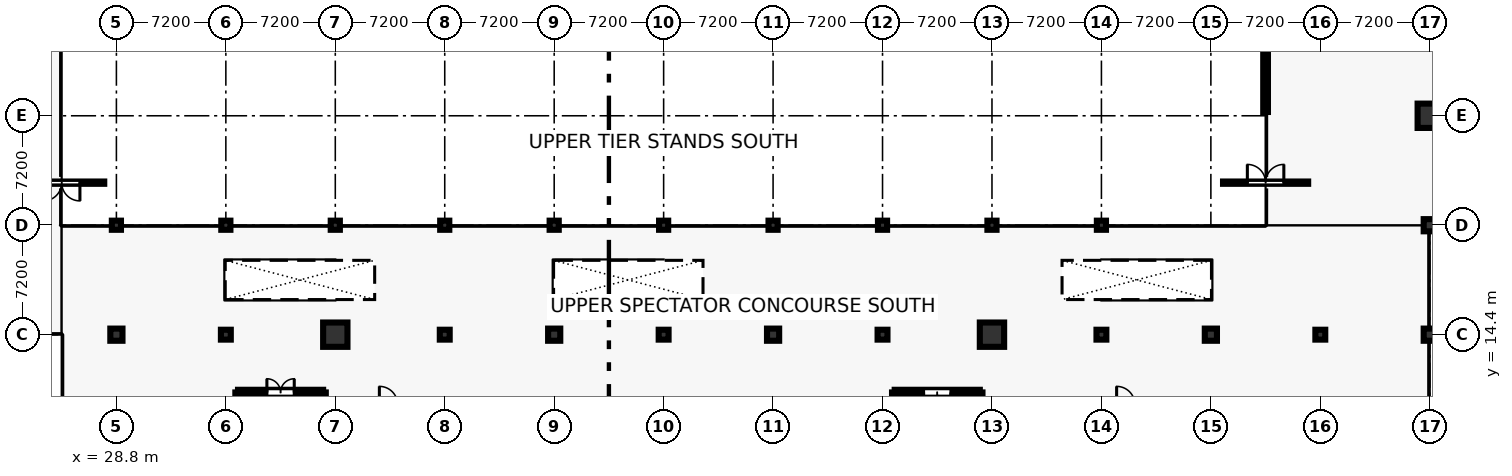
"""IFC4 building model, lengths in metres.
Left out: names, types, materials, properties, quantities, classifications, styles, units other than length and angle.
Written with IfcOpenShell. Run it as: python <this file> out.ifc"""

import sys

from ifc_helpers import new_model, si_unit, direction, frame, frame_2d, origin, origin_2d, place, context, subcontext, project, spatial, rectangle, circle, extrude, element, fill, save


model = new_model("IFC4")
c1 = context("Model", 3, precision=1e-05, world=origin(), true_north=direction((0.0, 1.0)))
c2 = subcontext(c1, "Body", "Model", "MODEL_VIEW")
j1 = project(units=[si_unit("LENGTHUNIT", "METRE"), si_unit("PLANEANGLEUNIT", "RADIAN")], contexts=[c1])
p1 = place(None, origin())
s1 = spatial("IfcSite", under=j1, at=p1, CompositionType="ELEMENT")
p2 = place(p1, origin())
s2 = spatial("IfcBuilding", under=s1, at=p2, CompositionType="ELEMENT")
p3 = place(p2, frame((0.0, 0.0, 13.8)))
s3 = spatial("IfcBuildingStorey", under=s2, at=p3, CompositionType="ELEMENT", Elevation=13.8)
p4 = place(p3, frame((28.8, 14.4, 0.0), z_axis=(0.0, 0.0, 1.0), x_axis=(1.0, 0.0, 0.0)))
e1 = element("IfcColumn", 1, at=p4, inside=s3, PredefinedType="COLUMN", context=c2, shape_type="SweptSolid", body=[
    extrude(circle(Radius=0.4, at=origin_2d()), origin(), (0.0, 0.0, 1.0), 4.8),
])
p5 = place(p3, frame((28.8, 21.6, 0.0), z_axis=(0.0, 0.0, 1.0), x_axis=(1.0, 0.0, 0.0)))
e2 = element("IfcColumn", 2, at=p5, inside=s3, PredefinedType="COLUMN", context=c2, shape_type="SweptSolid", body=[
    extrude(rectangle(XDim=0.6, YDim=0.6, at=origin_2d()), origin(), (0.0, 0.0, 1.0), 4.8),
])
p6 = place(p3, frame((36.0, 14.4, 0.0), z_axis=(0.0, 0.0, 1.0), x_axis=(1.0, 0.0, 0.0)))
e3 = element("IfcColumn", 3, at=p6, inside=s3, PredefinedType="COLUMN", context=c2, shape_type="SweptSolid", body=[
    extrude(rectangle(XDim=0.65, YDim=0.65, at=origin_2d()), origin(), (0.0, 0.0, 1.0), 4.8),
])
p7 = place(p3, frame((36.0, 21.6, 0.0), z_axis=(0.0, 0.0, 1.0), x_axis=(1.0, 0.0, 0.0)))
e4 = element("IfcColumn", 4, at=p7, inside=s3, PredefinedType="COLUMN", context=c2, shape_type="SweptSolid", body=[
    extrude(rectangle(XDim=0.6, YDim=0.6, at=origin_2d()), origin(), (0.0, 0.0, 1.0), 4.8),
])
p8 = place(p3, frame((43.2, 14.4, 0.0), z_axis=(0.0, 0.0, 1.0), x_axis=(1.0, 0.0, 0.0)))
e5 = element("IfcColumn", 5, at=p8, inside=s3, PredefinedType="COLUMN", context=c2, shape_type="SweptSolid", body=[
    extrude(circle(Radius=0.8, at=origin_2d()), origin(), (0.0, 0.0, 1.0), 4.8),
])
p9 = place(p3, frame((43.2, 21.6, 0.0), z_axis=(0.0, 0.0, 1.0), x_axis=(1.0, 0.0, 0.0)))
e6 = element("IfcColumn", 6, at=p9, inside=s3, PredefinedType="COLUMN", context=c2, shape_type="SweptSolid", body=[
    extrude(rectangle(XDim=0.6, YDim=0.6, at=origin_2d()), origin(), (0.0, 0.0, 1.0), 4.8),
])
p10 = place(p3, frame((50.4, 14.4, 0.0), z_axis=(0.0, 0.0, 1.0), x_axis=(1.0, 0.0, 0.0)))
e7 = element("IfcColumn", 7, at=p10, inside=s3, PredefinedType="COLUMN", context=c2, shape_type="SweptSolid", body=[
    extrude(rectangle(XDim=0.65, YDim=0.65, at=origin_2d()), origin(), (0.0, 0.0, 1.0), 4.8),
])
p11 = place(p3, frame((50.4, 21.6, 0.0), z_axis=(0.0, 0.0, 1.0), x_axis=(1.0, 0.0, 0.0)))
e8 = element("IfcColumn", 8, at=p11, inside=s3, PredefinedType="COLUMN", context=c2, shape_type="SweptSolid", body=[
    extrude(rectangle(XDim=0.6, YDim=0.6, at=origin_2d()), origin(), (0.0, 0.0, 1.0), 4.8),
])
p12 = place(p3, frame((57.6, 14.4, 0.0), z_axis=(0.0, 0.0, 1.0), x_axis=(1.0, 0.0, 0.0)))
e9 = element("IfcColumn", 9, at=p12, inside=s3, PredefinedType="COLUMN", context=c2, shape_type="SweptSolid", body=[
    extrude(circle(Radius=0.4, at=origin_2d()), origin(), (0.0, 0.0, 1.0), 4.8),
])
p13 = place(p3, frame((57.6, 21.6, 0.0), z_axis=(0.0, 0.0, 1.0), x_axis=(1.0, 0.0, 0.0)))
e10 = element("IfcColumn", 10, at=p13, inside=s3, PredefinedType="COLUMN", context=c2, shape_type="SweptSolid", body=[
    extrude(rectangle(XDim=0.6, YDim=0.6, at=origin_2d()), origin(), (0.0, 0.0, 1.0), 4.8),
])
p14 = place(p3, frame((64.8, 14.4, 0.0), z_axis=(0.0, 0.0, 1.0), x_axis=(1.0, 0.0, 0.0)))
e11 = element("IfcColumn", 11, at=p14, inside=s3, PredefinedType="COLUMN", context=c2, shape_type="SweptSolid", body=[
    extrude(rectangle(XDim=0.65, YDim=0.65, at=origin_2d()), origin(), (0.0, 0.0, 1.0), 4.8),
])
p15 = place(p3, frame((64.8, 21.6, 0.0), z_axis=(0.0, 0.0, 1.0), x_axis=(1.0, 0.0, 0.0)))
e12 = element("IfcColumn", 12, at=p15, inside=s3, PredefinedType="COLUMN", context=c2, shape_type="SweptSolid", body=[
    extrude(rectangle(XDim=0.6, YDim=0.6, at=origin_2d()), origin(), (0.0, 0.0, 1.0), 4.8),
])
p16 = place(p3, frame((72.0, 14.4, 0.0), z_axis=(0.0, 0.0, 1.0), x_axis=(1.0, 0.0, 0.0)))
e13 = element("IfcColumn", 13, at=p16, inside=s3, PredefinedType="COLUMN", context=c2, shape_type="SweptSolid", body=[
    extrude(circle(Radius=0.4, at=origin_2d()), origin(), (0.0, 0.0, 1.0), 4.8),
])
p17 = place(p3, frame((72.0, 21.6, 0.0), z_axis=(0.0, 0.0, 1.0), x_axis=(1.0, 0.0, 0.0)))
e14 = element("IfcColumn", 14, at=p17, inside=s3, PredefinedType="COLUMN", context=c2, shape_type="SweptSolid", body=[
    extrude(rectangle(XDim=0.6, YDim=0.6, at=origin_2d()), origin(), (0.0, 0.0, 1.0), 4.8),
])
p18 = place(p3, frame((79.2, 14.4, 0.0), z_axis=(0.0, 0.0, 1.0), x_axis=(1.0, 0.0, 0.0)))
e15 = element("IfcColumn", 15, at=p18, inside=s3, PredefinedType="COLUMN", context=c2, shape_type="SweptSolid", body=[
    extrude(rectangle(XDim=0.65, YDim=0.65, at=origin_2d()), origin(), (0.0, 0.0, 1.0), 4.8),
])
p19 = place(p3, frame((79.2, 21.6, 0.0), z_axis=(0.0, 0.0, 1.0), x_axis=(1.0, 0.0, 0.0)))
e16 = element("IfcColumn", 16, at=p19, inside=s3, PredefinedType="COLUMN", context=c2, shape_type="SweptSolid", body=[
    extrude(rectangle(XDim=0.6, YDim=0.6, at=origin_2d()), origin(), (0.0, 0.0, 1.0), 4.8),
])
p20 = place(p3, frame((86.4, 14.4, 0.0), z_axis=(0.0, 0.0, 1.0), x_axis=(1.0, 0.0, 0.0)))
e17 = element("IfcColumn", 17, at=p20, inside=s3, PredefinedType="COLUMN", context=c2, shape_type="SweptSolid", body=[
    extrude(circle(Radius=0.8, at=origin_2d()), origin(), (0.0, 0.0, 1.0), 4.8),
])
p21 = place(p3, frame((86.4, 21.6, 0.0), z_axis=(0.0, 0.0, 1.0), x_axis=(1.0, 0.0, 0.0)))
e18 = element("IfcColumn", 18, at=p21, inside=s3, PredefinedType="COLUMN", context=c2, shape_type="SweptSolid", body=[
    extrude(rectangle(XDim=0.6, YDim=0.6, at=origin_2d()), origin(), (0.0, 0.0, 1.0), 4.8),
])
p22 = place(p3, frame((93.6, 14.4, 0.0), z_axis=(0.0, 0.0, 1.0), x_axis=(1.0, 0.0, 0.0)))
e19 = element("IfcColumn", 19, at=p22, inside=s3, PredefinedType="COLUMN", context=c2, shape_type="SweptSolid", body=[
    extrude(rectangle(XDim=0.65, YDim=0.65, at=origin_2d()), origin(), (0.0, 0.0, 1.0), 4.8),
])
p23 = place(p3, frame((93.6, 21.6, 0.0), z_axis=(0.0, 0.0, 1.0), x_axis=(1.0, 0.0, 0.0)))
e20 = element("IfcColumn", 20, at=p23, inside=s3, PredefinedType="COLUMN", context=c2, shape_type="SweptSolid", body=[
    extrude(rectangle(XDim=0.6, YDim=0.6, at=origin_2d()), origin(), (0.0, 0.0, 1.0), 4.8),
])
p24 = place(p3, frame((100.8, 14.4, 0.0), z_axis=(0.0, 0.0, 1.0), x_axis=(1.0, 0.0, 0.0)))
e21 = element("IfcColumn", 21, at=p24, inside=s3, PredefinedType="COLUMN", context=c2, shape_type="SweptSolid", body=[
    extrude(circle(Radius=0.4, at=origin_2d()), origin(), (0.0, 0.0, 1.0), 4.8),
])
p25 = place(p3, frame((108.0, 14.4, 0.0), z_axis=(0.0, 0.0, 1.0), x_axis=(1.0, 0.0, 0.0)))
e22 = element("IfcColumn", 22, at=p25, inside=s3, PredefinedType="COLUMN", context=c2, shape_type="SweptSolid", body=[
    extrude(rectangle(XDim=0.65, YDim=0.65, at=origin_2d()), origin(), (0.0, 0.0, 1.0), 4.8),
])
for number, where, z_axis, x_axis in (
    (23, (115.2, 14.4, 0.0), (0.0, 0.0, 1.0), (1.0, 0.0, 0.0)),
    (24, (115.2, 21.6, 0.0), (0.0, 0.0, 1.0), (1.0, 0.0, 0.0)),
):
    element("IfcColumn", number, at=place(p3, frame(where, z_axis=z_axis, x_axis=x_axis)), inside=s3, PredefinedType="COLUMN", context=c2, shape_type="SweptSolid", body=[
        extrude(circle(Radius=0.4, at=origin_2d()), origin(), (0.0, 0.0, 1.0), 4.8),
    ])
p26 = place(p3, frame((115.2, 28.8, 0.0), z_axis=(0.0, 0.0, 1.0), x_axis=(1.0, 0.0, 0.0)))
e25 = element("IfcColumn", 25, at=p26, inside=s3, PredefinedType="COLUMN", context=c2, shape_type="SweptSolid", body=[
    extrude(circle(Radius=0.8, at=origin_2d()), origin(), (0.0, 0.0, 1.0), 4.8),
])
p27 = place(p3, frame((104.4, 29.05, 0.0), z_axis=(0.0, 0.0, 1.0), x_axis=(0.0, 1.0, 0.0)))
e26 = element("IfcWall", 26, at=p27, inside=s3, PredefinedType="SOLIDWALL", context=c2, shape_type="SweptSolid", body=[
    extrude(rectangle(XDim=6.7, YDim=0.31, at=frame_2d((3.35, 0.0))), origin(), (0.0, 0.0, 1.0), 3.59),
])
p28 = place(p27, frame((2.4, 0.0, 0.9)))
e27 = element("IfcOpeningElement", 27, at=p28, cuts=e26, PredefinedType="OPENING", context=c2, shape_type="SweptSolid", body=[
    extrude(rectangle(XDim=1.9, YDim=1.3, at=frame_2d((0.95, 0.65))), frame((0.0, 0.165, 0.0), z_axis=(0.0, -1.0, 0.0), x_axis=(1.0, 0.0, 0.0)), (0.0, 0.0, 1.0), 0.33),
])
p29 = place(p3, frame((42.4, 6.8, 0.0), z_axis=(0.0, 0.0, 1.0), x_axis=(0.0, 1.0, 0.0)))
e28 = element("IfcWall", 28, at=p29, inside=s3, PredefinedType="SHEAR", context=c2, shape_type="SweptSolid", body=[
    extrude(rectangle(XDim=3.8, YDim=0.35, at=frame_2d((1.9, 0.0))), origin(), (0.0, 0.0, 1.0), 3.59),
])
p30 = place(p3, frame((42.4, 10.6, 0.0), z_axis=(0.0, 0.0, 1.0), x_axis=(-1.0, 0.0, 0.0)))
e29 = element("IfcWall", 29, at=p30, inside=s3, PredefinedType="SHEAR", context=c2, shape_type="SweptSolid", body=[
    extrude(rectangle(XDim=5.6, YDim=0.35, at=frame_2d((2.8, 0.0))), origin(), (0.0, 0.0, 1.0), 3.59),
])
p31 = place(p30, frame((1.9, 0.0, 0.0)))
e30 = element("IfcOpeningElement", 30, at=p31, cuts=e29, PredefinedType="OPENING", context=c2, shape_type="SweptSolid", body=[
    extrude(rectangle(XDim=1.8, YDim=2.3, at=frame_2d((0.9, 1.15))), frame((0.0, 0.185, 0.0), z_axis=(0.0, -1.0, 0.0), x_axis=(1.0, 0.0, 0.0)), (0.0, 0.0, 1.0), 0.37),
])
for number, where, z_axis, x_axis in (
    (31, (36.8, 10.6, 0.0), (0.0, 0.0, 1.0), (0.0, -1.0, 0.0)),
    (32, (85.6, 6.8, 0.0), (0.0, 0.0, 1.0), (0.0, 1.0, 0.0)),
):
    element("IfcWall", number, at=place(p3, frame(where, z_axis=z_axis, x_axis=x_axis)), inside=s3, PredefinedType="SHEAR", context=c2, shape_type="SweptSolid", body=[
        extrude(rectangle(XDim=3.8, YDim=0.35, at=frame_2d((1.9, 0.0))), origin(), (0.0, 0.0, 1.0), 3.59),
    ])
p32 = place(p3, frame((85.6, 10.6, 0.0), z_axis=(0.0, 0.0, 1.0), x_axis=(-1.0, 0.0, 0.0)))
e33 = element("IfcWall", 33, at=p32, inside=s3, PredefinedType="SHEAR", context=c2, shape_type="SweptSolid", body=[
    extrude(rectangle(XDim=5.6, YDim=0.35, at=frame_2d((2.8, 0.0))), origin(), (0.0, 0.0, 1.0), 3.59),
])
p33 = place(p32, frame((1.9, 0.0, 0.0)))
e34 = element("IfcOpeningElement", 34, at=p33, cuts=e33, PredefinedType="OPENING", context=c2, shape_type="SweptSolid", body=[
    extrude(rectangle(XDim=1.8, YDim=2.3, at=frame_2d((0.9, 1.15))), frame((0.0, 0.185, 0.0), z_axis=(0.0, -1.0, 0.0), x_axis=(1.0, 0.0, 0.0)), (0.0, 0.0, 1.0), 0.37),
])
p34 = place(p3, frame((80.0, 10.6, 0.0), z_axis=(0.0, 0.0, 1.0), x_axis=(0.0, -1.0, 0.0)))
e35 = element("IfcWall", 35, at=p34, inside=s3, PredefinedType="SHEAR", context=c2, shape_type="SweptSolid", body=[
    extrude(rectangle(XDim=3.8, YDim=0.35, at=frame_2d((1.9, 0.0))), origin(), (0.0, 0.0, 1.0), 3.59),
])
p35 = place(p3, frame((22.4, 24.4, 0.0), z_axis=(0.0, 0.0, 1.0), x_axis=(1.0, 0.0, 0.0)))
e36 = element("IfcWall", 36, at=p35, inside=s3, PredefinedType="PARTITIONING", context=c2, shape_type="SweptSolid", body=[
    extrude(rectangle(XDim=5.6, YDim=0.15, at=frame_2d((2.8, 0.0))), origin(), (0.0, 0.0, 1.0), 2.6),
])
p36 = place(p35, frame((1.6, 0.0, 0.0)))
e37 = element("IfcOpeningElement", 37, at=p36, cuts=e36, PredefinedType="OPENING", context=c2, shape_type="SweptSolid", body=[
    extrude(rectangle(XDim=2.4, YDim=2.2, at=frame_2d((1.2, 1.1))), frame((0.0, 0.085, 0.0), z_axis=(0.0, -1.0, 0.0), x_axis=(1.0, 0.0, 0.0)), (0.0, 0.0, 1.0), 0.17),
])
p37 = place(p3, frame((101.6, 24.4, 0.0), z_axis=(0.0, 0.0, 1.0), x_axis=(1.0, 0.0, 0.0)))
e38 = element("IfcWall", 38, at=p37, inside=s3, PredefinedType="PARTITIONING", context=c2, shape_type="SweptSolid", body=[
    extrude(rectangle(XDim=5.6, YDim=0.15, at=frame_2d((2.8, 0.0))), origin(), (0.0, 0.0, 1.0), 2.6),
])
p38 = place(p37, frame((1.6, 0.0, 0.0)))
e39 = element("IfcOpeningElement", 39, at=p38, cuts=e38, PredefinedType="OPENING", context=c2, shape_type="SweptSolid", body=[
    extrude(rectangle(XDim=2.4, YDim=2.2, at=frame_2d((1.2, 1.1))), frame((0.0, 0.085, 0.0), z_axis=(0.0, -1.0, 0.0), x_axis=(1.0, 0.0, 0.0)), (0.0, 0.0, 1.0), 0.17),
])
p39 = place(p28, origin())
e40 = element("IfcWindow", 40, at=p39, inside=s3, PartitioningType="SINGLE_PANEL", PredefinedType="WINDOW", context=c2, shape_type="SweptSolid", body=[
    extrude(rectangle(XDim=1.9, YDim=1.3, at=frame_2d((0.95, 0.65))), frame((0.0, 0.03, 0.0), z_axis=(0.0, -1.0, 0.0), x_axis=(1.0, 0.0, 0.0)), (0.0, 0.0, 1.0), 0.06),
])
fill(e27, e40)
p40 = place(p31, frame((1.8, 0.0, 0.0), z_axis=(0.0, 0.0, 1.0), x_axis=(-1.0, 0.0, 0.0)))
e41 = element("IfcDoor", 41, at=p40, inside=s3, OperationType="DOUBLE_DOOR_SINGLE_SWING", PredefinedType="DOOR", context=c2, shape_type="SweptSolid", body=[
    extrude(rectangle(XDim=1.8, YDim=2.3, at=frame_2d((0.9, 1.15))), frame((0.0, 0.025, 0.0), z_axis=(0.0, -1.0, 0.0), x_axis=(1.0, 0.0, 0.0)), (0.0, 0.0, 1.0), 0.05),
])
fill(e30, e41)
p41 = place(p33, origin())
e42 = element("IfcDoor", 42, at=p41, inside=s3, OperationType="DOUBLE_DOOR_SINGLE_SWING", PredefinedType="DOOR", context=c2, shape_type="SweptSolid", body=[
    extrude(rectangle(XDim=1.8, YDim=2.3, at=frame_2d((0.9, 1.15))), frame((0.0, 0.025, 0.0), z_axis=(0.0, -1.0, 0.0), x_axis=(1.0, 0.0, 0.0)), (0.0, 0.0, 1.0), 0.05),
])
fill(e34, e42)
p42 = place(p36, frame((2.4, 0.0, 0.0), z_axis=(0.0, 0.0, 1.0), x_axis=(-1.0, 0.0, 0.0)))
e43 = element("IfcDoor", 43, at=p42, inside=s3, OperationType="DOUBLE_DOOR_SINGLE_SWING", PredefinedType="GATE", context=c2, shape_type="SweptSolid", body=[
    extrude(rectangle(XDim=2.4, YDim=2.2, at=frame_2d((1.2, 1.1))), frame((0.0, 0.025, 0.0), z_axis=(0.0, -1.0, 0.0), x_axis=(1.0, 0.0, 0.0)), (0.0, 0.0, 1.0), 0.05),
])
fill(e37, e43)
p43 = place(p38, origin())
e44 = element("IfcDoor", 44, at=p43, inside=s3, OperationType="DOUBLE_DOOR_SINGLE_SWING", PredefinedType="GATE", context=c2, shape_type="SweptSolid", body=[
    extrude(rectangle(XDim=2.4, YDim=2.2, at=frame_2d((1.2, 1.1))), frame((0.0, 0.025, 0.0), z_axis=(0.0, -1.0, 0.0), x_axis=(1.0, 0.0, 0.0)), (0.0, 0.0, 1.0), 0.05),
])
fill(e39, e44)
save(model, sys.argv[1])
